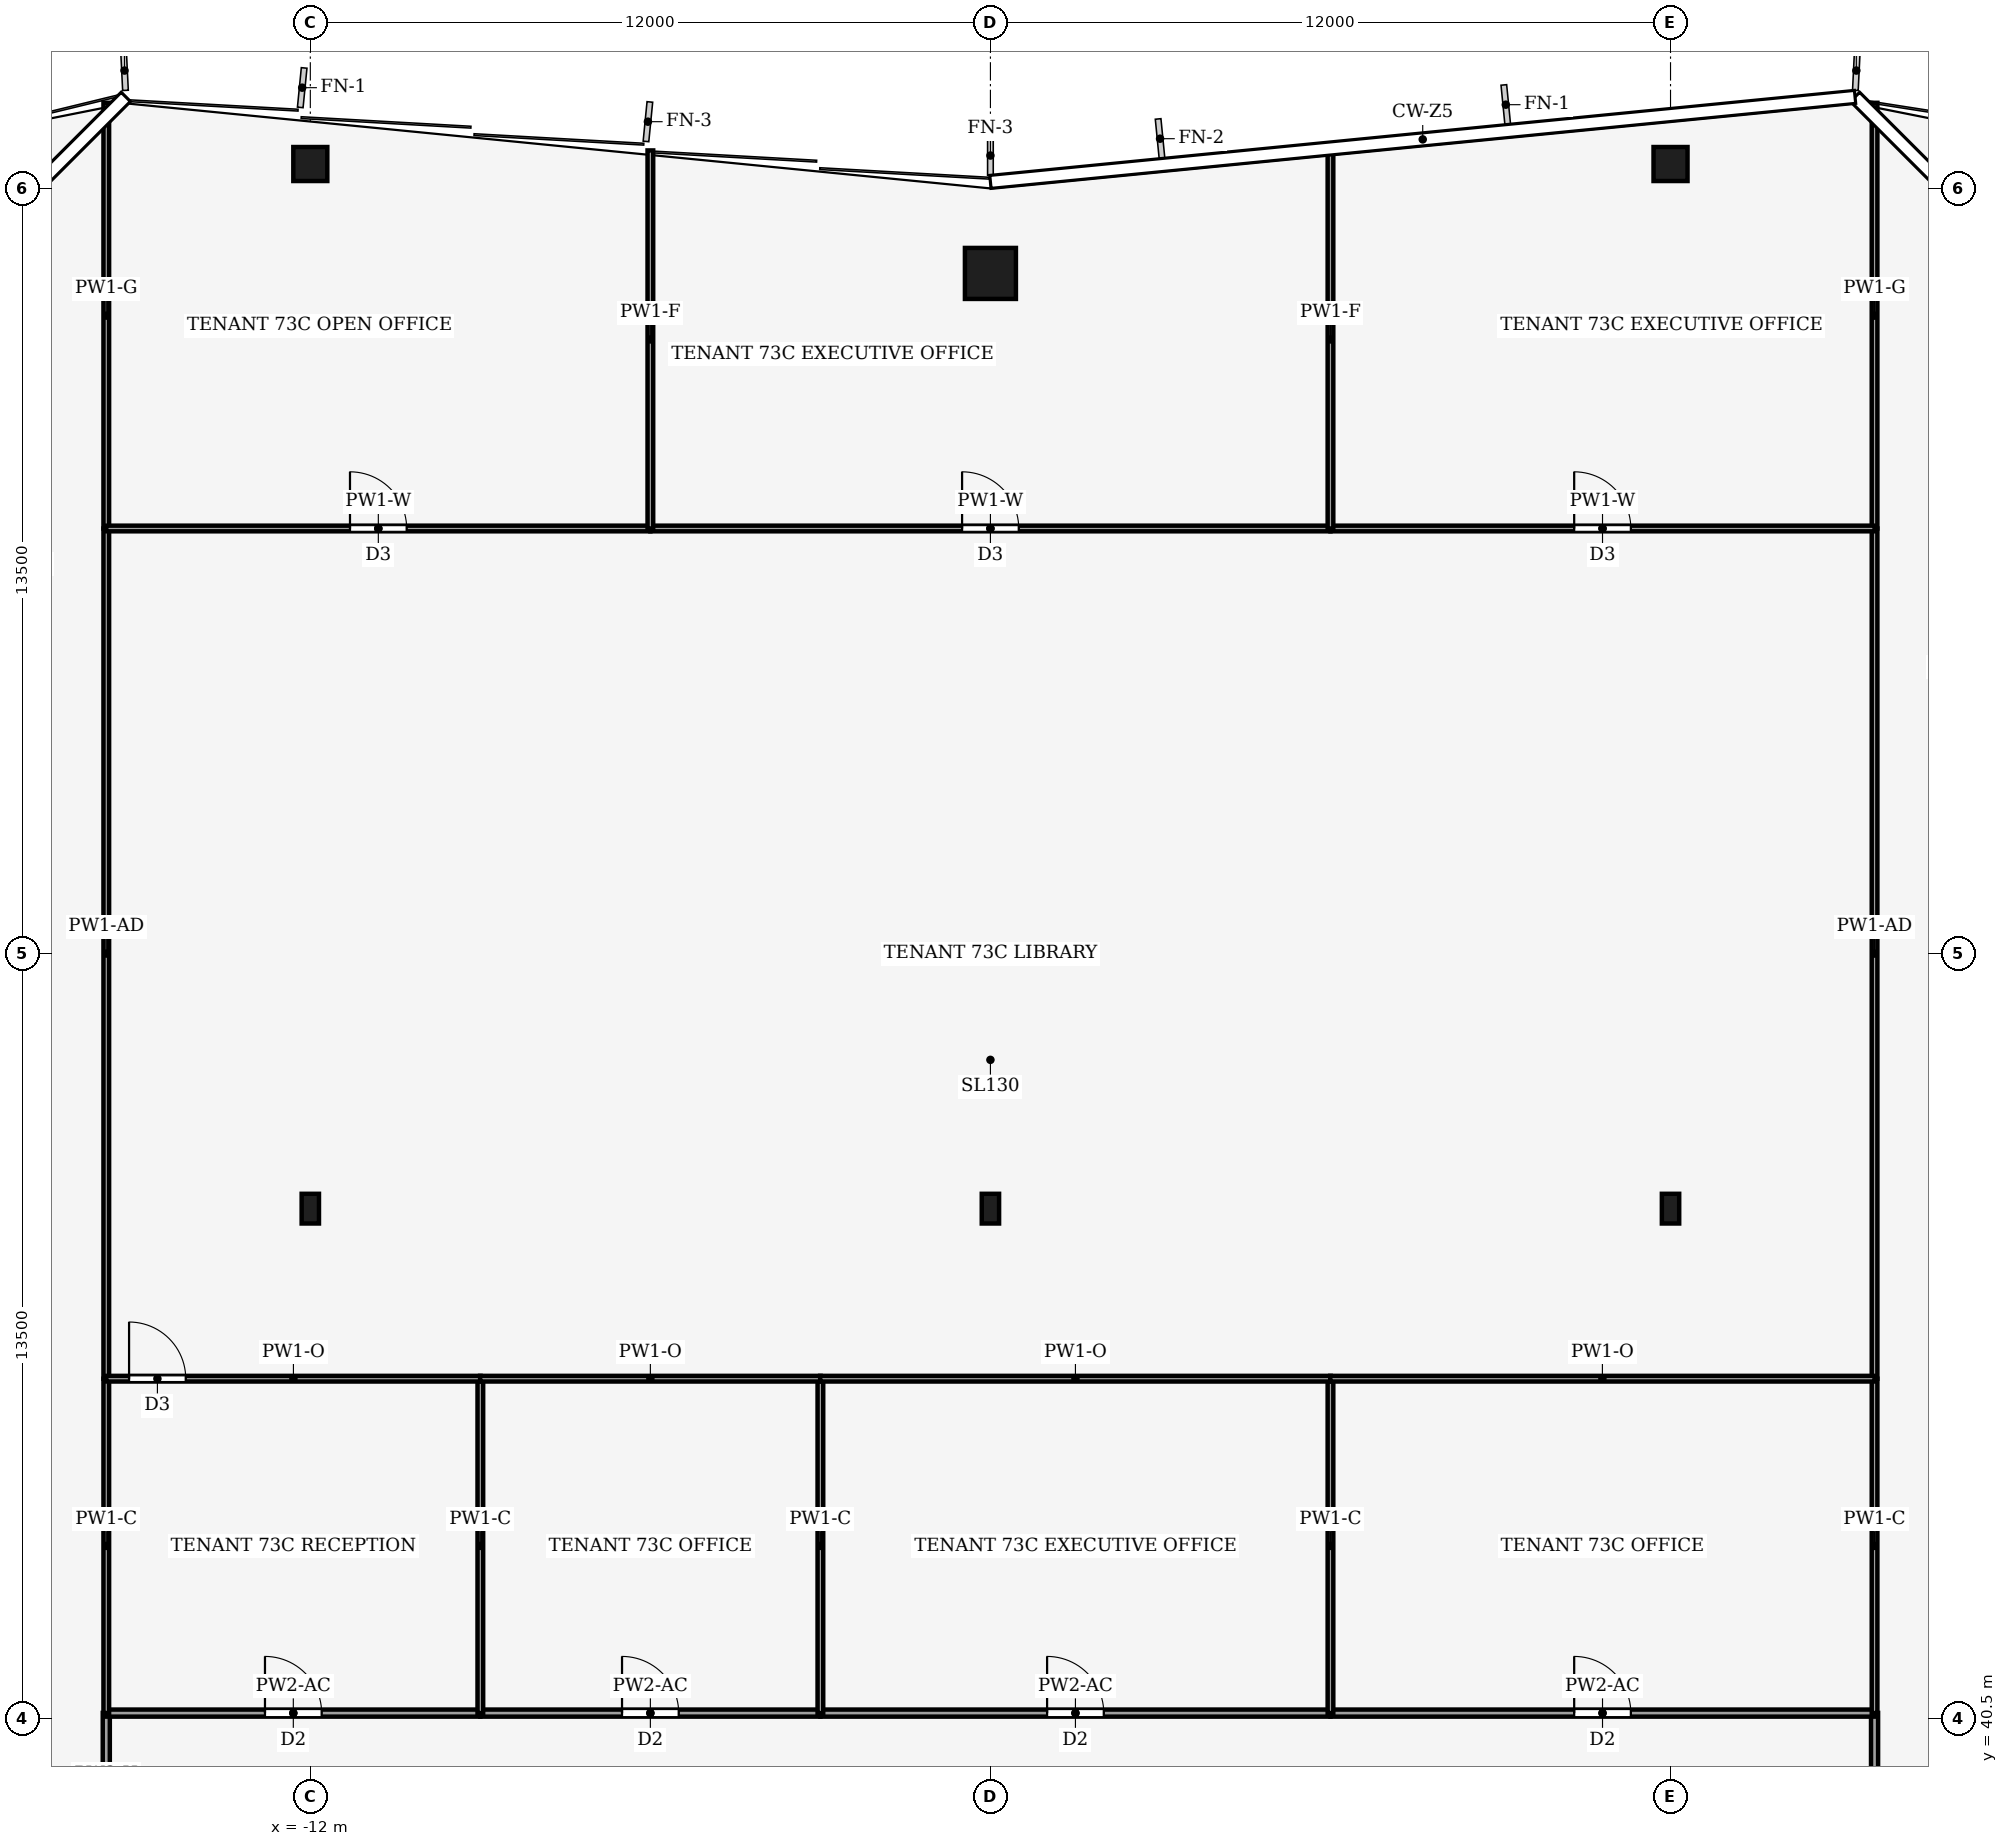
"""IFC4 building model, lengths in metres.
Left out: names, types, materials, properties, quantities, classifications, styles, units other than length and angle.
Written with IfcOpenShell. Run it as: python <this file> out.ifc"""

import sys

from ifc_helpers import new_model, si_unit, direction, frame, frame_2d, origin, origin_2d, place, context, subcontext, project, spatial, rectangle, hollow_rectangle, i_section, extrude, element, fill, save


model = new_model("IFC4")
c1 = context("Model", 3, precision=1e-05, world=origin(), true_north=direction((0.0, 1.0)))
c2 = subcontext(c1, "Body", "Model", "MODEL_VIEW")
j1 = project(units=[si_unit("LENGTHUNIT", "METRE"), si_unit("PLANEANGLEUNIT", "RADIAN")], contexts=[c1])
p1 = place(None, origin())
s1 = spatial("IfcSite", under=j1, at=p1, CompositionType="ELEMENT")
p2 = place(p1, origin())
s2 = spatial("IfcBuilding", under=s1, at=p2, CompositionType="ELEMENT")
p3 = place(p2, frame((0.0, 0.0, 318.0)))
s3 = spatial("IfcBuildingStorey", under=s2, at=p3, CompositionType="ELEMENT", Elevation=318.0)
p4 = place(p3, frame((0.0, 66.0, 0.0), z_axis=(0.0, 0.0, 1.0), x_axis=(1.0, 0.0, 0.0)))
e1 = element("IfcColumn", 1, at=p4, inside=s3, PredefinedType="COLUMN", context=c2, shape_type="SweptSolid", body=[
    extrude(hollow_rectangle(XDim=0.9, YDim=0.9, WallThickness=0.04, at=origin_2d()), origin(), (0.0, 0.0, 1.0), 4.0),
])
for number, where, z_axis, x_axis in (
    (2, (-12.0, 67.93, 0.0), (0.0, 0.0, 1.0), (1.0, 0.0, 0.0)),
    (3, (12.0, 67.93, 0.0), (0.0, 0.0, 1.0), (1.0, 0.0, 0.0)),
):
    element("IfcColumn", number, at=place(p3, frame(where, z_axis=z_axis, x_axis=x_axis)), inside=s3, PredefinedType="COLUMN", context=c2, shape_type="SweptSolid", body=[
        extrude(hollow_rectangle(XDim=0.6, YDim=0.6, WallThickness=0.025, at=origin_2d()), origin(), (0.0, 0.0, 1.0), 4.0),
    ])
for number, where, z_axis, x_axis in (
    (4, (-12.0, 49.5, 0.0), (0.0, 0.0, 1.0), (1.0, 0.0, 0.0)),
    (5, (0.0, 49.5, 0.0), (0.0, 0.0, 1.0), (1.0, 0.0, 0.0)),
    (6, (12.0, 49.5, 0.0), (0.0, 0.0, 1.0), (1.0, 0.0, 0.0)),
):
    element("IfcColumn", number, at=place(p3, frame(where, z_axis=z_axis, x_axis=x_axis)), inside=s3, PredefinedType="COLUMN", context=c2, shape_type="SweptSolid", body=[
        extrude(i_section(OverallWidth=0.306, OverallDepth=0.524, WebThickness=0.012, FlangeThickness=0.04, FilletRadius=0.027, at=origin_2d()), origin(), (0.0, 0.0, 1.0), 4.0),
    ])
p5 = place(p3, frame((-15.6, 37.5, 0.0), z_axis=(0.0, 0.0, 1.0), x_axis=(0.0, 1.0, 0.0)))
e7 = element("IfcWall", 7, at=p5, inside=s3, PredefinedType="PARTITIONING", context=c2, shape_type="SweptSolid", body=[
    extrude(rectangle(XDim=3.104, YDim=0.125, at=frame_2d((1.552, 0.0))), origin(), (0.0, 0.0, 1.0), 3.14),
])
p6 = place(p5, frame((0.252, 0.0, 0.0)))
e8 = element("IfcOpeningElement", 8, at=p6, cuts=e7, PredefinedType="OPENING", context=c2, shape_type="SweptSolid", body=[
    extrude(rectangle(XDim=1.0, YDim=2.1, at=frame_2d((0.5, 1.05))), frame((0.0, 0.073, 0.0), z_axis=(0.0, -1.0, 0.0), x_axis=(1.0, 0.0, 0.0)), (0.0, 0.0, 1.0), 0.145),
])
p7 = place(p3, frame((15.6, 40.604, 0.0), z_axis=(0.0, 0.0, 1.0), x_axis=(0.0, -1.0, 0.0)))
e9 = element("IfcWall", 9, at=p7, inside=s3, PredefinedType="PARTITIONING", context=c2, shape_type="SweptSolid", body=[
    extrude(rectangle(XDim=9.104, YDim=0.125, at=frame_2d((4.552, 0.0))), origin(), (0.0, 0.0, 1.0), 3.14),
])
p8 = place(p7, frame((4.052, 0.0, 0.0)))
e10 = element("IfcOpeningElement", 10, at=p8, cuts=e9, PredefinedType="OPENING", context=c2, shape_type="SweptSolid", body=[
    extrude(rectangle(XDim=1.0, YDim=2.1, at=frame_2d((0.5, 1.05))), frame((0.0, 0.073, 0.0), z_axis=(0.0, -1.0, 0.0), x_axis=(1.0, 0.0, 0.0)), (0.0, 0.0, 1.0), 0.145),
])
p9 = place(p3, frame((-15.6, 40.6, 0.0), z_axis=(0.0, 0.0, 1.0), x_axis=(1.0, 0.0, 0.0)))
e11 = element("IfcWall", 11, at=p9, inside=s3, PredefinedType="PARTITIONING", context=c2, shape_type="SweptSolid", body=[
    extrude(rectangle(XDim=6.6, YDim=0.125, at=frame_2d((3.3, 0.0))), origin(), (0.0, 0.0, 1.0), 3.39),
])
p10 = place(p9, frame((2.8, 0.0, 0.0)))
e12 = element("IfcOpeningElement", 12, at=p10, cuts=e11, PredefinedType="OPENING", context=c2, shape_type="SweptSolid", body=[
    extrude(rectangle(XDim=1.0, YDim=2.1, at=frame_2d((0.5, 1.05))), frame((0.0, 0.073, 0.0), z_axis=(0.0, -1.0, 0.0), x_axis=(1.0, 0.0, 0.0)), (0.0, 0.0, 1.0), 0.145),
])
p11 = place(p3, frame((-9.0, 40.6, 0.0), z_axis=(0.0, 0.0, 1.0), x_axis=(1.0, 0.0, 0.0)))
e13 = element("IfcWall", 13, at=p11, inside=s3, PredefinedType="PARTITIONING", context=c2, shape_type="SweptSolid", body=[
    extrude(rectangle(XDim=6.0, YDim=0.125, at=frame_2d((3.0, 0.0))), origin(), (0.0, 0.0, 1.0), 3.39),
])
p12 = place(p11, frame((2.5, 0.0, 0.0)))
e14 = element("IfcOpeningElement", 14, at=p12, cuts=e13, PredefinedType="OPENING", context=c2, shape_type="SweptSolid", body=[
    extrude(rectangle(XDim=1.0, YDim=2.1, at=frame_2d((0.5, 1.05))), frame((0.0, 0.073, 0.0), z_axis=(0.0, -1.0, 0.0), x_axis=(1.0, 0.0, 0.0)), (0.0, 0.0, 1.0), 0.145),
])
p13 = place(p3, frame((-3.0, 40.6, 0.0), z_axis=(0.0, 0.0, 1.0), x_axis=(1.0, 0.0, 0.0)))
e15 = element("IfcWall", 15, at=p13, inside=s3, PredefinedType="PARTITIONING", context=c2, shape_type="SweptSolid", body=[
    extrude(rectangle(XDim=9.0, YDim=0.125, at=frame_2d((4.5, 0.0))), origin(), (0.0, 0.0, 1.0), 3.39),
])
p14 = place(p13, frame((4.0, 0.0, 0.0)))
e16 = element("IfcOpeningElement", 16, at=p14, cuts=e15, PredefinedType="OPENING", context=c2, shape_type="SweptSolid", body=[
    extrude(rectangle(XDim=1.0, YDim=2.1, at=frame_2d((0.5, 1.05))), frame((0.0, 0.073, 0.0), z_axis=(0.0, -1.0, 0.0), x_axis=(1.0, 0.0, 0.0)), (0.0, 0.0, 1.0), 0.145),
])
p15 = place(p3, frame((6.0, 40.6, 0.0), z_axis=(0.0, 0.0, 1.0), x_axis=(1.0, 0.0, 0.0)))
e17 = element("IfcWall", 17, at=p15, inside=s3, PredefinedType="PARTITIONING", context=c2, shape_type="SweptSolid", body=[
    extrude(rectangle(XDim=9.6, YDim=0.125, at=frame_2d((4.8, 0.0))), origin(), (0.0, 0.0, 1.0), 3.39),
])
p16 = place(p15, frame((4.3, 0.0, 0.0)))
e18 = element("IfcOpeningElement", 18, at=p16, cuts=e17, PredefinedType="OPENING", context=c2, shape_type="SweptSolid", body=[
    extrude(rectangle(XDim=1.0, YDim=2.1, at=frame_2d((0.5, 1.05))), frame((0.0, 0.073, 0.0), z_axis=(0.0, -1.0, 0.0), x_axis=(1.0, 0.0, 0.0)), (0.0, 0.0, 1.0), 0.145),
])
p17 = place(p3, frame((-15.6, 40.6, 0.0), z_axis=(0.0, 0.0, 1.0), x_axis=(0.0, 1.0, 0.0)))
e19 = element("IfcWall", 19, at=p17, inside=s3, PredefinedType="PARTITIONING", context=c2, shape_type="SweptSolid", body=[
    extrude(rectangle(XDim=5.9, YDim=0.1, at=frame_2d((2.95, 0.0))), origin(), (0.0, 0.0, 1.0), 3.87),
])
p18 = place(p3, frame((-15.6, 46.5, 0.0), z_axis=(0.0, 0.0, 1.0), x_axis=(0.0, 1.0, 0.0)))
e20 = element("IfcWall", 20, at=p18, inside=s3, PredefinedType="PARTITIONING", context=c2, shape_type="SweptSolid", body=[
    extrude(rectangle(XDim=15.0, YDim=0.1, at=frame_2d((7.5, 0.0))), origin(), (0.0, 0.0, 1.0), 3.35),
])
p19 = place(p3, frame((-15.6, 61.5, 0.0), z_axis=(0.0, 0.0, 1.0), x_axis=(0.0, 1.0, 0.0)))
e21 = element("IfcWall", 21, at=p19, inside=s3, PredefinedType="PARTITIONING", context=c2, shape_type="SweptSolid", body=[
    extrude(rectangle(XDim=7.51, YDim=0.1, at=frame_2d((3.755, 0.0))), origin(), (0.0, 0.0, 1.0), 2.93),
])
p20 = place(p3, frame((15.6, 46.5, 0.0), z_axis=(0.0, 0.0, 1.0), x_axis=(0.0, -1.0, 0.0)))
e22 = element("IfcWall", 22, at=p20, inside=s3, PredefinedType="PARTITIONING", context=c2, shape_type="SweptSolid", body=[
    extrude(rectangle(XDim=5.9, YDim=0.1, at=frame_2d((2.95, 0.0))), origin(), (0.0, 0.0, 1.0), 3.87),
])
p21 = place(p3, frame((15.6, 61.5, 0.0), z_axis=(0.0, 0.0, 1.0), x_axis=(0.0, -1.0, 0.0)))
e23 = element("IfcWall", 23, at=p21, inside=s3, PredefinedType="PARTITIONING", context=c2, shape_type="SweptSolid", body=[
    extrude(rectangle(XDim=15.0, YDim=0.1, at=frame_2d((7.5, 0.0))), origin(), (0.0, 0.0, 1.0), 3.35),
])
p22 = place(p3, frame((15.6, 69.01, 0.0), z_axis=(0.0, 0.0, 1.0), x_axis=(0.0, -1.0, 0.0)))
e24 = element("IfcWall", 24, at=p22, inside=s3, PredefinedType="PARTITIONING", context=c2, shape_type="SweptSolid", body=[
    extrude(rectangle(XDim=7.51, YDim=0.1, at=frame_2d((3.755, 0.0))), origin(), (0.0, 0.0, 1.0), 2.93),
])
p23 = place(p3, frame((-9.0, 40.6, 0.0), z_axis=(0.0, 0.0, 1.0), x_axis=(0.0, 1.0, 0.0)))
e25 = element("IfcWall", 25, at=p23, inside=s3, PredefinedType="PARTITIONING", context=c2, shape_type="SweptSolid", body=[
    extrude(rectangle(XDim=5.9, YDim=0.1, at=frame_2d((2.95, 0.0))), origin(), (0.0, 0.0, 1.0), 3.87),
])
p24 = place(p3, frame((-15.6, 46.5, 0.0), z_axis=(0.0, 0.0, 1.0), x_axis=(1.0, 0.0, 0.0)))
e26 = element("IfcWall", 26, at=p24, inside=s3, PredefinedType="PARTITIONING", context=c2, shape_type="SweptSolid", body=[
    extrude(rectangle(XDim=6.604, YDim=0.1, at=frame_2d((3.302, 0.0))), origin(), (0.0, 0.0, 1.0), 3.39),
])
p25 = place(p24, frame((0.402, 0.0, 0.0)))
e27 = element("IfcOpeningElement", 27, at=p25, cuts=e26, PredefinedType="OPENING", context=c2, shape_type="SweptSolid", body=[
    extrude(rectangle(XDim=1.0, YDim=2.1, at=frame_2d((0.5, 1.05))), frame((0.0, 0.06, 0.0), z_axis=(0.0, -1.0, 0.0), x_axis=(1.0, 0.0, 0.0)), (0.0, 0.0, 1.0), 0.12),
])
p26 = place(p3, frame((-3.0, 40.6, 0.0), z_axis=(0.0, 0.0, 1.0), x_axis=(0.0, 1.0, 0.0)))
e28 = element("IfcWall", 28, at=p26, inside=s3, PredefinedType="PARTITIONING", context=c2, shape_type="SweptSolid", body=[
    extrude(rectangle(XDim=5.9, YDim=0.1, at=frame_2d((2.95, 0.0))), origin(), (0.0, 0.0, 1.0), 3.87),
])
p27 = place(p3, frame((-2.996, 46.5, 0.0), z_axis=(0.0, 0.0, 1.0), x_axis=(-1.0, 0.0, 0.0)))
e29 = element("IfcWall", 29, at=p27, inside=s3, PredefinedType="PARTITIONING", context=c2, shape_type="SweptSolid", body=[
    extrude(rectangle(XDim=6.008, YDim=0.1, at=frame_2d((3.004, 0.0))), origin(), (0.0, 0.0, 1.0), 3.39),
])
p28 = place(p3, frame((6.0, 40.6, 0.0), z_axis=(0.0, 0.0, 1.0), x_axis=(0.0, 1.0, 0.0)))
e30 = element("IfcWall", 30, at=p28, inside=s3, PredefinedType="PARTITIONING", context=c2, shape_type="SweptSolid", body=[
    extrude(rectangle(XDim=5.9, YDim=0.1, at=frame_2d((2.95, 0.0))), origin(), (0.0, 0.0, 1.0), 3.87),
])
p29 = place(p3, frame((6.004, 46.5, 0.0), z_axis=(0.0, 0.0, 1.0), x_axis=(-1.0, 0.0, 0.0)))
e31 = element("IfcWall", 31, at=p29, inside=s3, PredefinedType="PARTITIONING", context=c2, shape_type="SweptSolid", body=[
    extrude(rectangle(XDim=9.008, YDim=0.1, at=frame_2d((4.504, 0.0))), origin(), (0.0, 0.0, 1.0), 3.39),
])
p30 = place(p3, frame((15.6, 46.5, 0.0), z_axis=(0.0, 0.0, 1.0), x_axis=(-1.0, 0.0, 0.0)))
e32 = element("IfcWall", 32, at=p30, inside=s3, PredefinedType="PARTITIONING", context=c2, shape_type="SweptSolid", body=[
    extrude(rectangle(XDim=9.604, YDim=0.1, at=frame_2d((4.802, 0.0))), origin(), (0.0, 0.0, 1.0), 3.39),
])
p31 = place(p3, frame((-15.6, 61.5, 0.0), z_axis=(0.0, 0.0, 1.0), x_axis=(1.0, 0.0, 0.0)))
e33 = element("IfcWall", 33, at=p31, inside=s3, PredefinedType="PARTITIONING", context=c2, shape_type="SweptSolid", body=[
    extrude(rectangle(XDim=9.6, YDim=0.1, at=frame_2d((4.8, 0.0))), origin(), (0.0, 0.0, 1.0), 3.24),
])
p32 = place(p31, frame((4.3, 0.0, 0.0)))
e34 = element("IfcOpeningElement", 34, at=p32, cuts=e33, PredefinedType="OPENING", context=c2, shape_type="SweptSolid", body=[
    extrude(rectangle(XDim=1.0, YDim=2.1, at=frame_2d((0.5, 1.05))), frame((0.0, 0.06, 0.0), z_axis=(0.0, -1.0, 0.0), x_axis=(1.0, 0.0, 0.0)), (0.0, 0.0, 1.0), 0.12),
])
p33 = place(p3, frame((-6.0, 61.5, 0.0), z_axis=(0.0, 0.0, 1.0), x_axis=(1.0, 0.0, 0.0)))
e35 = element("IfcWall", 35, at=p33, inside=s3, PredefinedType="PARTITIONING", context=c2, shape_type="SweptSolid", body=[
    extrude(rectangle(XDim=12.0, YDim=0.1, at=frame_2d((6.0, 0.0))), origin(), (0.0, 0.0, 1.0), 3.24),
])
p34 = place(p33, frame((5.5, 0.0, 0.0)))
e36 = element("IfcOpeningElement", 36, at=p34, cuts=e35, PredefinedType="OPENING", context=c2, shape_type="SweptSolid", body=[
    extrude(rectangle(XDim=1.0, YDim=2.1, at=frame_2d((0.5, 1.05))), frame((0.0, 0.06, 0.0), z_axis=(0.0, -1.0, 0.0), x_axis=(1.0, 0.0, 0.0)), (0.0, 0.0, 1.0), 0.12),
])
p35 = place(p3, frame((6.0, 61.5, 0.0), z_axis=(0.0, 0.0, 1.0), x_axis=(1.0, 0.0, 0.0)))
e37 = element("IfcWall", 37, at=p35, inside=s3, PredefinedType="PARTITIONING", context=c2, shape_type="SweptSolid", body=[
    extrude(rectangle(XDim=9.6, YDim=0.1, at=frame_2d((4.8, 0.0))), origin(), (0.0, 0.0, 1.0), 3.24),
])
p36 = place(p35, frame((4.3, 0.0, 0.0)))
e38 = element("IfcOpeningElement", 38, at=p36, cuts=e37, PredefinedType="OPENING", context=c2, shape_type="SweptSolid", body=[
    extrude(rectangle(XDim=1.0, YDim=2.1, at=frame_2d((0.5, 1.05))), frame((0.0, 0.06, 0.0), z_axis=(0.0, -1.0, 0.0), x_axis=(1.0, 0.0, 0.0)), (0.0, 0.0, 1.0), 0.12),
])
for number, where, z_axis, x_axis in (
    (39, (-6.0, 61.5, 0.0), (0.0, 0.0, 1.0), (0.0, 1.0, 0.0)),
    (40, (6.0, 61.5, 0.0), (0.0, 0.0, 1.0), (0.0, 1.0, 0.0)),
):
    element("IfcWall", number, at=place(p3, frame(where, z_axis=z_axis, x_axis=x_axis)), inside=s3, PredefinedType="PARTITIONING", context=c2, shape_type="SweptSolid", body=[
        extrude(rectangle(XDim=6.67, YDim=0.1, at=frame_2d((3.335, 0.0))), origin(), (0.0, 0.0, 1.0), 3.04),
    ])
p37 = place(p10, origin())
e41 = element("IfcDoor", 41, at=p37, inside=s3, OperationType="SINGLE_SWING_RIGHT", PredefinedType="DOOR", context=c2, shape_type="SweptSolid", body=[
    extrude(rectangle(XDim=1.0, YDim=2.1, at=frame_2d((0.5, 1.05))), frame((0.0, 0.025, 0.0), z_axis=(0.0, -1.0, 0.0), x_axis=(1.0, 0.0, 0.0)), (0.0, 0.0, 1.0), 0.05),
])
fill(e12, e41)
p38 = place(p12, origin())
e42 = element("IfcDoor", 42, at=p38, inside=s3, OperationType="SINGLE_SWING_LEFT", PredefinedType="DOOR", context=c2, shape_type="SweptSolid", body=[
    extrude(rectangle(XDim=1.0, YDim=2.1, at=frame_2d((0.5, 1.05))), frame((0.0, 0.025, 0.0), z_axis=(0.0, -1.0, 0.0), x_axis=(1.0, 0.0, 0.0)), (0.0, 0.0, 1.0), 0.05),
])
fill(e14, e42)
p39 = place(p14, origin())
e43 = element("IfcDoor", 43, at=p39, inside=s3, OperationType="SINGLE_SWING_RIGHT", PredefinedType="DOOR", context=c2, shape_type="SweptSolid", body=[
    extrude(rectangle(XDim=1.0, YDim=2.1, at=frame_2d((0.5, 1.05))), frame((0.0, 0.025, 0.0), z_axis=(0.0, -1.0, 0.0), x_axis=(1.0, 0.0, 0.0)), (0.0, 0.0, 1.0), 0.05),
])
fill(e16, e43)
p40 = place(p16, origin())
e44 = element("IfcDoor", 44, at=p40, inside=s3, OperationType="SINGLE_SWING_LEFT", PredefinedType="DOOR", context=c2, shape_type="SweptSolid", body=[
    extrude(rectangle(XDim=1.0, YDim=2.1, at=frame_2d((0.5, 1.05))), frame((0.0, 0.025, 0.0), z_axis=(0.0, -1.0, 0.0), x_axis=(1.0, 0.0, 0.0)), (0.0, 0.0, 1.0), 0.05),
])
fill(e18, e44)
p41 = place(p25, origin())
e45 = element("IfcDoor", 45, at=p41, inside=s3, OperationType="SINGLE_SWING_LEFT", PredefinedType="DOOR", context=c2, shape_type="SweptSolid", body=[
    extrude(rectangle(XDim=1.0, YDim=2.1, at=frame_2d((0.5, 1.05))), frame((0.0, 0.025, 0.0), z_axis=(0.0, -1.0, 0.0), x_axis=(1.0, 0.0, 0.0)), (0.0, 0.0, 1.0), 0.05),
])
fill(e27, e45)
p42 = place(p32, origin())
e46 = element("IfcDoor", 46, at=p42, inside=s3, OperationType="SINGLE_SWING_LEFT", PredefinedType="DOOR", context=c2, shape_type="SweptSolid", body=[
    extrude(rectangle(XDim=1.0, YDim=2.1, at=frame_2d((0.5, 1.05))), frame((0.0, 0.025, 0.0), z_axis=(0.0, -1.0, 0.0), x_axis=(1.0, 0.0, 0.0)), (0.0, 0.0, 1.0), 0.05),
])
fill(e34, e46)
p43 = place(p34, origin())
e47 = element("IfcDoor", 47, at=p43, inside=s3, OperationType="SINGLE_SWING_RIGHT", PredefinedType="DOOR", context=c2, shape_type="SweptSolid", body=[
    extrude(rectangle(XDim=1.0, YDim=2.1, at=frame_2d((0.5, 1.05))), frame((0.0, 0.025, 0.0), z_axis=(0.0, -1.0, 0.0), x_axis=(1.0, 0.0, 0.0)), (0.0, 0.0, 1.0), 0.05),
])
fill(e36, e47)
p44 = place(p36, origin())
e48 = element("IfcDoor", 48, at=p44, inside=s3, OperationType="SINGLE_SWING_LEFT", PredefinedType="DOOR", context=c2, shape_type="SweptSolid", body=[
    extrude(rectangle(XDim=1.0, YDim=2.1, at=frame_2d((0.5, 1.05))), frame((0.0, 0.025, 0.0), z_axis=(0.0, -1.0, 0.0), x_axis=(1.0, 0.0, 0.0)), (0.0, 0.0, 1.0), 0.05),
])
fill(e38, e48)
save(model, sys.argv[1])
